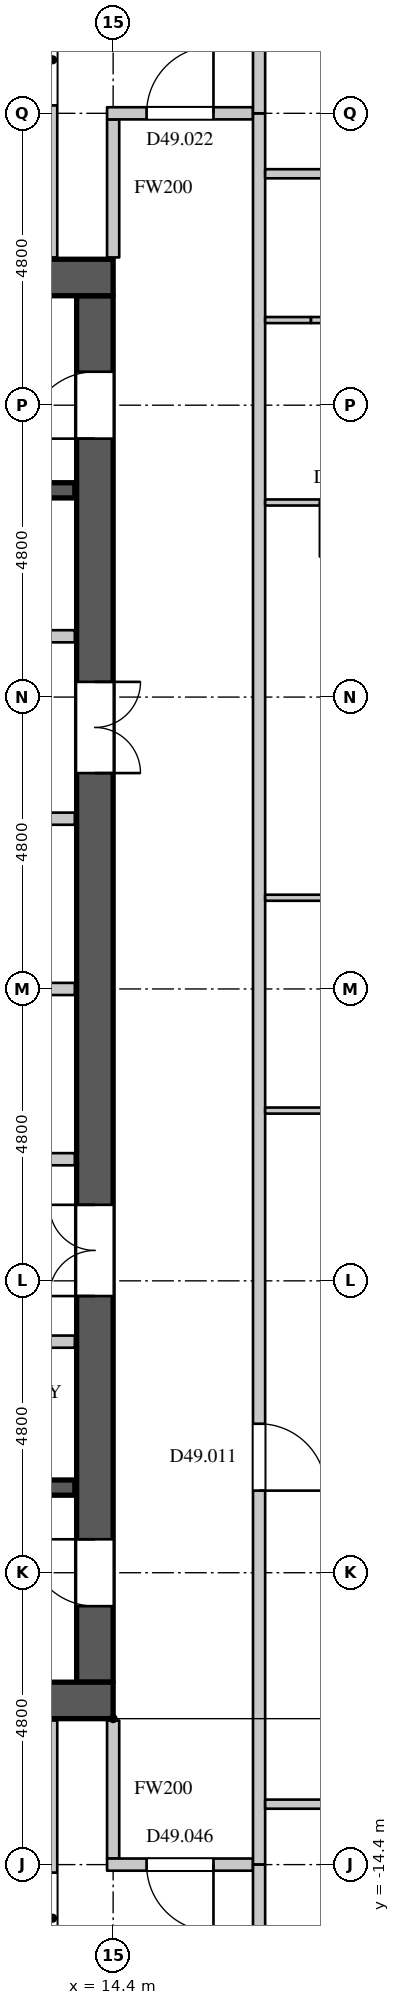
"""IFC4 building model, lengths in metres.
Left out: names, types, materials, properties, quantities, classifications, styles, units other than length and angle.
Written with IfcOpenShell. Run it as: python <this file> out.ifc"""

import sys

from ifc_helpers import new_model, si_unit, direction, frame, frame_2d, origin, place, context, subcontext, project, spatial, rectangle, extrude, element, fill, save


model = new_model("IFC4")
c1 = context("Model", 3, precision=1e-05, world=origin(), true_north=direction((0.0, 1.0)))
c2 = subcontext(c1, "Body", "Model", "MODEL_VIEW")
j1 = project(units=[si_unit("LENGTHUNIT", "METRE"), si_unit("PLANEANGLEUNIT", "RADIAN")], contexts=[c1])
p1 = place(None, origin())
s1 = spatial("IfcSite", under=j1, at=p1, CompositionType="ELEMENT")
p2 = place(p1, origin())
s2 = spatial("IfcBuilding", under=s1, at=p2, CompositionType="ELEMENT")
p3 = place(p2, frame((0.0, 0.0, 213.9)))
s3 = spatial("IfcBuildingStorey", under=s2, at=p3, CompositionType="ELEMENT", Elevation=213.9)
for number, where, z_axis, x_axis in (
    (1, (-14.4, 11.7, 0.0), (0.0, 0.0, 1.0), (1.0, 0.0, 0.0)),
    (2, (-14.4, -11.7, 0.0), (0.0, 0.0, 1.0), (1.0, 0.0, 0.0)),
):
    element("IfcWall", number, at=place(p3, frame(where, z_axis=z_axis, x_axis=x_axis)), inside=s3, PredefinedType="SHEAR", context=c2, shape_type="SweptSolid", body=[
        extrude(rectangle(XDim=28.8, YDim=0.6, at=frame_2d((14.4, 0.0))), origin(), (0.0, 0.0, 1.0), 4.2),
    ])
p4 = place(p3, frame((14.1, -11.4, 0.0), z_axis=(0.0, 0.0, 1.0), x_axis=(0.0, 1.0, 0.0)))
e3 = element("IfcWall", 3, at=p4, inside=s3, PredefinedType="SHEAR", context=c2, shape_type="SweptSolid", body=[
    extrude(rectangle(XDim=22.8, YDim=0.6, at=frame_2d((11.4, 0.0))), origin(), (0.0, 0.0, 1.0), 4.2),
])
p5 = place(p4, frame((20.45, 0.0, 0.0)))
e4 = element("IfcOpeningElement", 4, at=p5, cuts=e3, PredefinedType="OPENING", context=c2, shape_type="SweptSolid", body=[
    extrude(rectangle(XDim=1.1, YDim=2.2, at=frame_2d((0.55, 1.1))), frame((0.0, 0.31, 0.0), z_axis=(0.0, -1.0, 0.0), x_axis=(1.0, 0.0, 0.0)), (0.0, 0.0, 1.0), 0.62),
])
p6 = place(p4, frame((1.25, 0.0, 0.0)))
e5 = element("IfcOpeningElement", 5, at=p6, cuts=e3, PredefinedType="OPENING", context=c2, shape_type="SweptSolid", body=[
    extrude(rectangle(XDim=1.1, YDim=2.2, at=frame_2d((0.55, 1.1))), frame((0.0, 0.31, 0.0), z_axis=(0.0, -1.0, 0.0), x_axis=(1.0, 0.0, 0.0)), (0.0, 0.0, 1.0), 0.62),
])
p7 = place(p4, frame((14.95, 0.0, 0.0)))
e6 = element("IfcOpeningElement", 6, at=p7, cuts=e3, PredefinedType="OPENING", context=c2, shape_type="SweptSolid", body=[
    extrude(rectangle(XDim=1.5, YDim=2.4, at=frame_2d((0.75, 1.2))), frame((0.0, 0.31, 0.0), z_axis=(0.0, -1.0, 0.0), x_axis=(1.0, 0.0, 0.0)), (0.0, 0.0, 1.0), 0.62),
])
p8 = place(p4, frame((6.35, 0.0, 0.0)))
e7 = element("IfcOpeningElement", 7, at=p8, cuts=e3, PredefinedType="OPENING", context=c2, shape_type="SweptSolid", body=[
    extrude(rectangle(XDim=1.5, YDim=2.4, at=frame_2d((0.75, 1.2))), frame((0.0, 0.31, 0.0), z_axis=(0.0, -1.0, 0.0), x_axis=(1.0, 0.0, 0.0)), (0.0, 0.0, 1.0), 0.62),
])
p9 = place(p3, frame((-7.7, -5.8, 0.0), z_axis=(0.0, 0.0, 1.0), x_axis=(1.0, 0.0, 0.0)))
e8 = element("IfcWall", 8, at=p9, inside=s3, PredefinedType="PARTITIONING", context=c2, shape_type="SweptSolid", body=[
    extrude(rectangle(XDim=21.47, YDim=0.2, at=frame_2d((10.735, 0.0))), origin(), (0.0, 0.0, 1.0), 3.95),
])
p10 = place(p9, frame((1.75, 0.0, 0.0)))
e9 = element("IfcOpeningElement", 9, at=p10, cuts=e8, PredefinedType="OPENING", context=c2, shape_type="SweptSolid", body=[
    extrude(rectangle(XDim=0.9, YDim=2.2, at=frame_2d((0.45, 1.1))), frame((0.0, 0.11, 0.0), z_axis=(0.0, -1.0, 0.0), x_axis=(1.0, 0.0, 0.0)), (0.0, 0.0, 1.0), 0.22),
])
p11 = place(p9, frame((5.95, 0.0, 0.0)))
e10 = element("IfcOpeningElement", 10, at=p11, cuts=e8, PredefinedType="OPENING", context=c2, shape_type="SweptSolid", body=[
    extrude(rectangle(XDim=0.9, YDim=2.2, at=frame_2d((0.45, 1.1))), frame((0.0, 0.11, 0.0), z_axis=(0.0, -1.0, 0.0), x_axis=(1.0, 0.0, 0.0)), (0.0, 0.0, 1.0), 0.22),
])
p12 = place(p9, frame((10.35, 0.0, 0.0)))
e11 = element("IfcOpeningElement", 11, at=p12, cuts=e8, PredefinedType="OPENING", context=c2, shape_type="SweptSolid", body=[
    extrude(rectangle(XDim=0.9, YDim=2.2, at=frame_2d((0.45, 1.1))), frame((0.0, 0.11, 0.0), z_axis=(0.0, -1.0, 0.0), x_axis=(1.0, 0.0, 0.0)), (0.0, 0.0, 1.0), 0.22),
])
p13 = place(p9, frame((14.65, 0.0, 0.0)))
e12 = element("IfcOpeningElement", 12, at=p13, cuts=e8, PredefinedType="OPENING", context=c2, shape_type="SweptSolid", body=[
    extrude(rectangle(XDim=0.9, YDim=2.2, at=frame_2d((0.45, 1.1))), frame((0.0, 0.11, 0.0), z_axis=(0.0, -1.0, 0.0), x_axis=(1.0, 0.0, 0.0)), (0.0, 0.0, 1.0), 0.22),
])
p14 = place(p9, frame((18.75, 0.0, 0.0)))
e13 = element("IfcOpeningElement", 13, at=p14, cuts=e8, PredefinedType="OPENING", context=c2, shape_type="SweptSolid", body=[
    extrude(rectangle(XDim=0.9, YDim=2.2, at=frame_2d((0.45, 1.1))), frame((0.0, 0.11, 0.0), z_axis=(0.0, -1.0, 0.0), x_axis=(1.0, 0.0, 0.0)), (0.0, 0.0, 1.0), 0.22),
])
p15 = place(p3, frame((-7.7, 5.8, 0.0), z_axis=(0.0, 0.0, 1.0), x_axis=(1.0, 0.0, 0.0)))
e14 = element("IfcWall", 14, at=p15, inside=s3, PredefinedType="PARTITIONING", context=c2, shape_type="SweptSolid", body=[
    extrude(rectangle(XDim=21.47, YDim=0.2, at=frame_2d((10.735, 0.0))), origin(), (0.0, 0.0, 1.0), 3.95),
])
p16 = place(p15, frame((4.95, 0.0, 0.0)))
e15 = element("IfcOpeningElement", 15, at=p16, cuts=e14, PredefinedType="OPENING", context=c2, shape_type="SweptSolid", body=[
    extrude(rectangle(XDim=0.9, YDim=2.2, at=frame_2d((0.45, 1.1))), frame((0.0, 0.11, 0.0), z_axis=(0.0, -1.0, 0.0), x_axis=(1.0, 0.0, 0.0)), (0.0, 0.0, 1.0), 0.22),
])
p17 = place(p15, frame((15.55, 0.0, 0.0)))
e16 = element("IfcOpeningElement", 16, at=p17, cuts=e14, PredefinedType="OPENING", context=c2, shape_type="SweptSolid", body=[
    extrude(rectangle(XDim=0.9, YDim=2.2, at=frame_2d((0.45, 1.1))), frame((0.0, 0.11, 0.0), z_axis=(0.0, -1.0, 0.0), x_axis=(1.0, 0.0, 0.0)), (0.0, 0.0, 1.0), 0.22),
])
p18 = place(p3, frame((14.4, -14.3, 0.0), z_axis=(0.0, 0.0, 1.0), x_axis=(0.0, 1.0, 0.0)))
e17 = element("IfcWall", 17, at=p18, inside=s3, PredefinedType="PARTITIONING", context=c2, shape_type="SweptSolid", body=[
    extrude(rectangle(XDim=2.27, YDim=0.2, at=frame_2d((1.135, 0.0))), origin(), (0.0, 0.0, 1.0), 3.95),
])
p19 = place(p3, frame((14.3, -14.4, 0.0), z_axis=(0.0, 0.0, 1.0), x_axis=(1.0, 0.0, 0.0)))
e18 = element("IfcWall", 18, at=p19, inside=s3, PredefinedType="PARTITIONING", context=c2, shape_type="SweptSolid", body=[
    extrude(rectangle(XDim=2.4, YDim=0.2, at=frame_2d((1.2, 0.0))), origin(), (0.0, 0.0, 1.0), 3.95),
])
p20 = place(p19, frame((0.65, 0.0, 0.0)))
e19 = element("IfcOpeningElement", 19, at=p20, cuts=e18, PredefinedType="OPENING", context=c2, shape_type="SweptSolid", body=[
    extrude(rectangle(XDim=1.1, YDim=2.4, at=frame_2d((0.55, 1.2))), frame((0.0, 0.11, 0.0), z_axis=(0.0, -1.0, 0.0), x_axis=(1.0, 0.0, 0.0)), (0.0, 0.0, 1.0), 0.22),
])
p21 = place(p3, frame((14.4, 12.03, 0.0), z_axis=(0.0, 0.0, 1.0), x_axis=(0.0, 1.0, 0.0)))
e20 = element("IfcWall", 20, at=p21, inside=s3, PredefinedType="PARTITIONING", context=c2, shape_type="SweptSolid", body=[
    extrude(rectangle(XDim=2.27, YDim=0.2, at=frame_2d((1.135, 0.0))), origin(), (0.0, 0.0, 1.0), 3.95),
])
p22 = place(p3, frame((14.3, 14.4, 0.0), z_axis=(0.0, 0.0, 1.0), x_axis=(1.0, 0.0, 0.0)))
e21 = element("IfcWall", 21, at=p22, inside=s3, PredefinedType="PARTITIONING", context=c2, shape_type="SweptSolid", body=[
    extrude(rectangle(XDim=2.4, YDim=0.2, at=frame_2d((1.2, 0.0))), origin(), (0.0, 0.0, 1.0), 3.95),
])
p23 = place(p22, frame((0.65, 0.0, 0.0)))
e22 = element("IfcOpeningElement", 22, at=p23, cuts=e21, PredefinedType="OPENING", context=c2, shape_type="SweptSolid", body=[
    extrude(rectangle(XDim=1.1, YDim=2.4, at=frame_2d((0.55, 1.2))), frame((0.0, 0.11, 0.0), z_axis=(0.0, -1.0, 0.0), x_axis=(1.0, 0.0, 0.0)), (0.0, 0.0, 1.0), 0.22),
])
p24 = place(p3, frame((16.8, -14.4, 0.0), z_axis=(0.0, 0.0, 1.0), x_axis=(0.0, 1.0, 0.0)))
e23 = element("IfcWall", 23, at=p24, inside=s3, PredefinedType="PARTITIONING", context=c2, shape_type="SweptSolid", body=[
    extrude(rectangle(XDim=28.8, YDim=0.2, at=frame_2d((14.4, 0.0))), origin(), (0.0, 0.0, 1.0), 3.95),
])
p25 = place(p24, frame((6.15, 0.0, 0.0)))
e24 = element("IfcOpeningElement", 24, at=p25, cuts=e23, PredefinedType="OPENING", context=c2, shape_type="SweptSolid", body=[
    extrude(rectangle(XDim=1.1, YDim=2.4, at=frame_2d((0.55, 1.2))), frame((0.0, 0.11, 0.0), z_axis=(0.0, -1.0, 0.0), x_axis=(1.0, 0.0, 0.0)), (0.0, 0.0, 1.0), 0.22),
])
p26 = place(p3, frame((13.406, -25.731, 0.0), z_axis=(0.0, 0.0, 1.0), x_axis=(0.0, 1.0, 0.0)))
e25 = element("IfcWall", 25, at=p26, inside=s3, PredefinedType="PARTITIONING", context=c2, shape_type="SweptSolid", body=[
    extrude(rectangle(XDim=13.701, YDim=0.15, at=frame_2d((6.851, 0.0))), origin(), (0.0, 0.0, 1.0), 3.3),
])
p27 = place(p26, frame((9.7, 0.0, 0.0)))
e26 = element("IfcOpeningElement", 26, at=p27, cuts=e25, PredefinedType="OPENING", context=c2, shape_type="SweptSolid", body=[
    extrude(rectangle(XDim=1.5, YDim=2.2, at=frame_2d((0.75, 1.1))), frame((0.0, 0.085, 0.0), z_axis=(0.0, -1.0, 0.0), x_axis=(1.0, 0.0, 0.0)), (0.0, 0.0, 1.0), 0.17),
])
p28 = place(p3, frame((13.406, 12.03, 0.0), z_axis=(0.0, 0.0, 1.0), x_axis=(0.0, 1.0, 0.0)))
e27 = element("IfcWall", 27, at=p28, inside=s3, PredefinedType="PARTITIONING", context=c2, shape_type="SweptSolid", body=[
    extrude(rectangle(XDim=13.701, YDim=0.15, at=frame_2d((6.851, 0.0))), origin(), (0.0, 0.0, 1.0), 3.3),
])
p29 = place(p28, frame((2.5, 0.0, 0.0)))
e28 = element("IfcOpeningElement", 28, at=p29, cuts=e27, PredefinedType="OPENING", context=c2, shape_type="SweptSolid", body=[
    extrude(rectangle(XDim=1.5, YDim=2.2, at=frame_2d((0.75, 1.1))), frame((0.0, 0.085, 0.0), z_axis=(0.0, -1.0, 0.0), x_axis=(1.0, 0.0, 0.0)), (0.0, 0.0, 1.0), 0.17),
])
p30 = place(p3, frame((16.9, -13.406, 0.0), z_axis=(0.0, 0.0, 1.0), x_axis=(1.0, 0.0, 0.0)))
e29 = element("IfcWall", 29, at=p30, inside=s3, PredefinedType="PARTITIONING", context=c2, shape_type="SweptSolid", body=[
    extrude(rectangle(XDim=8.324, YDim=0.15, at=frame_2d((4.162, 0.0))), origin(), (0.0, 0.0, 1.0), 3.95),
])
p31 = place(p30, frame((1.2, 0.0, 0.0)))
e30 = element("IfcOpeningElement", 30, at=p31, cuts=e29, PredefinedType="OPENING", context=c2, shape_type="SweptSolid", body=[
    extrude(rectangle(XDim=0.95, YDim=2.2, at=frame_2d((0.475, 1.1))), frame((0.0, 0.085, 0.0), z_axis=(0.0, -1.0, 0.0), x_axis=(1.0, 0.0, 0.0)), (0.0, 0.0, 1.0), 0.17),
])
p32 = place(p3, frame((16.9, 13.406, 0.0), z_axis=(0.0, 0.0, 1.0), x_axis=(1.0, 0.0, 0.0)))
e31 = element("IfcWall", 31, at=p32, inside=s3, PredefinedType="PARTITIONING", context=c2, shape_type="SweptSolid", body=[
    extrude(rectangle(XDim=8.324, YDim=0.15, at=frame_2d((4.162, 0.0))), origin(), (0.0, 0.0, 1.0), 3.95),
])
p33 = place(p32, frame((5.0, 0.0, 0.0)))
e32 = element("IfcOpeningElement", 32, at=p33, cuts=e31, PredefinedType="OPENING", context=c2, shape_type="SweptSolid", body=[
    extrude(rectangle(XDim=1.5, YDim=2.2, at=frame_2d((0.75, 1.1))), frame((0.0, 0.085, 0.0), z_axis=(0.0, -1.0, 0.0), x_axis=(1.0, 0.0, 0.0)), (0.0, 0.0, 1.0), 0.17),
])
p34 = place(p32, frame((1.0, 0.0, 0.0)))
e33 = element("IfcOpeningElement", 33, at=p34, cuts=e31, PredefinedType="OPENING", context=c2, shape_type="SweptSolid", body=[
    extrude(rectangle(XDim=0.9, YDim=2.2, at=frame_2d((0.45, 1.1))), frame((0.0, 0.085, 0.0), z_axis=(0.0, -1.0, 0.0), x_axis=(1.0, 0.0, 0.0)), (0.0, 0.0, 1.0), 0.17),
])
for number, where, z_axis, x_axis in (
    (34, (16.8, -19.803, 0.0), (0.0, 0.0, 1.0), (0.0, 1.0, 0.0)),
    (35, (16.8, 14.4, 0.0), (0.0, 0.0, 1.0), (0.0, 1.0, 0.0)),
):
    element("IfcWall", number, at=place(p3, frame(where, z_axis=z_axis, x_axis=x_axis)), inside=s3, PredefinedType="PARTITIONING", context=c2, shape_type="SweptSolid", body=[
        extrude(rectangle(XDim=5.403, YDim=0.2, at=frame_2d((2.702, 0.0))), origin(), (0.0, 0.0, 1.0), 3.95),
    ])
p35 = place(p3, frame((7.8, -2.8, 0.0), z_axis=(0.0, 0.0, 1.0), x_axis=(1.0, 0.0, 0.0)))
e36 = element("IfcWall", 36, at=p35, inside=s3, PredefinedType="PARTITIONING", context=c2, shape_type="SweptSolid", body=[
    extrude(rectangle(XDim=5.97, YDim=0.2, at=frame_2d((2.985, 0.0))), origin(), (0.0, 0.0, 1.0), 3.95),
])
p36 = place(p35, frame((2.55, 0.0, 0.0)))
e37 = element("IfcOpeningElement", 37, at=p36, cuts=e36, PredefinedType="OPENING", context=c2, shape_type="SweptSolid", body=[
    extrude(rectangle(XDim=0.9, YDim=2.2, at=frame_2d((0.45, 1.1))), frame((0.0, 0.11, 0.0), z_axis=(0.0, -1.0, 0.0), x_axis=(1.0, 0.0, 0.0)), (0.0, 0.0, 1.0), 0.22),
])
p37 = place(p3, frame((7.8, 0.0, 0.0), z_axis=(0.0, 0.0, 1.0), x_axis=(1.0, 0.0, 0.0)))
e38 = element("IfcWall", 38, at=p37, inside=s3, PredefinedType="PARTITIONING", context=c2, shape_type="SweptSolid", body=[
    extrude(rectangle(XDim=5.97, YDim=0.2, at=frame_2d((2.985, 0.0))), origin(), (0.0, 0.0, 1.0), 3.95),
])
p38 = place(p3, frame((10.42, 2.8, 0.0), z_axis=(0.0, 0.0, 1.0), x_axis=(1.0, 0.0, 0.0)))
e39 = element("IfcWall", 39, at=p38, inside=s3, PredefinedType="PARTITIONING", context=c2, shape_type="SweptSolid", body=[
    extrude(rectangle(XDim=3.35, YDim=0.2, at=frame_2d((1.675, 0.0))), origin(), (0.0, 0.0, 1.0), 3.95),
])
p39 = place(p38, frame((1.35, 0.0, 0.0)))
e40 = element("IfcOpeningElement", 40, at=p39, cuts=e39, PredefinedType="OPENING", context=c2, shape_type="SweptSolid", body=[
    extrude(rectangle(XDim=0.6, YDim=2.0, at=frame_2d((0.3, 1.0))), frame((0.0, 0.11, 0.0), z_axis=(0.0, -1.0, 0.0), x_axis=(1.0, 0.0, 0.0)), (0.0, 0.0, 1.0), 0.22),
])
p40 = place(p3, frame((5.525, -8.2, 0.0), z_axis=(0.0, 0.0, 1.0), x_axis=(1.0, 0.0, 0.0)))
e41 = element("IfcWall", 41, at=p40, inside=s3, PredefinedType="SHEAR", context=c2, shape_type="SweptSolid", body=[
    extrude(rectangle(XDim=8.245, YDim=0.25, at=frame_2d((4.123, 0.0))), origin(), (0.0, 0.0, 1.0), 3.95),
])
p41 = place(p3, frame((5.275, 8.2, 0.0), z_axis=(0.0, 0.0, 1.0), x_axis=(1.0, 0.0, 0.0)))
e42 = element("IfcWall", 42, at=p41, inside=s3, PredefinedType="SHEAR", context=c2, shape_type="SweptSolid", body=[
    extrude(rectangle(XDim=8.495, YDim=0.25, at=frame_2d((4.248, 0.0))), origin(), (0.0, 0.0, 1.0), 3.95),
])
p42 = place(p3, frame((16.9, -2.0, 0.0), z_axis=(0.0, 0.0, 1.0), x_axis=(1.0, 0.0, 0.0)))
e43 = element("IfcWall", 43, at=p42, inside=s3, PredefinedType="PARTITIONING", context=c2, shape_type="SweptSolid", body=[
    extrude(rectangle(XDim=3.75, YDim=0.1, at=frame_2d((1.875, 0.0))), origin(), (0.0, 0.0, 1.0), 3.95),
])
p43 = place(p42, frame((1.45, 0.0, 0.0)))
e44 = element("IfcOpeningElement", 44, at=p43, cuts=e43, PredefinedType="OPENING", context=c2, shape_type="SweptSolid", body=[
    extrude(rectangle(XDim=0.9, YDim=2.2, at=frame_2d((0.45, 1.1))), frame((0.0, 0.06, 0.0), z_axis=(0.0, -1.0, 0.0), x_axis=(1.0, 0.0, 0.0)), (0.0, 0.0, 1.0), 0.12),
])
p44 = place(p3, frame((16.9, 1.5, 0.0), z_axis=(0.0, 0.0, 1.0), x_axis=(1.0, 0.0, 0.0)))
e45 = element("IfcWall", 45, at=p44, inside=s3, PredefinedType="PARTITIONING", context=c2, shape_type="SweptSolid", body=[
    extrude(rectangle(XDim=3.725, YDim=0.1, at=frame_2d((1.863, 0.0))), origin(), (0.0, 0.0, 1.0), 3.95),
])
p45 = place(p3, frame((16.9, 8.0, 0.0), z_axis=(0.0, 0.0, 1.0), x_axis=(1.0, 0.0, 0.0)))
e46 = element("IfcWall", 46, at=p45, inside=s3, PredefinedType="PARTITIONING", context=c2, shape_type="SweptSolid", body=[
    extrude(rectangle(XDim=2.775, YDim=0.1, at=frame_2d((1.388, 0.0))), origin(), (0.0, 0.0, 1.0), 3.95),
])
p46 = place(p45, frame((0.9, 0.0, 0.0)))
e47 = element("IfcOpeningElement", 47, at=p46, cuts=e46, PredefinedType="OPENING", context=c2, shape_type="SweptSolid", body=[
    extrude(rectangle(XDim=0.9, YDim=2.2, at=frame_2d((0.45, 1.1))), frame((0.0, 0.06, 0.0), z_axis=(0.0, -1.0, 0.0), x_axis=(1.0, 0.0, 0.0)), (0.0, 0.0, 1.0), 0.12),
])
p47 = place(p3, frame((16.9, 11.0, 0.0), z_axis=(0.0, 0.0, 1.0), x_axis=(1.0, 0.0, 0.0)))
e48 = element("IfcWall", 48, at=p47, inside=s3, PredefinedType="PARTITIONING", context=c2, shape_type="SweptSolid", body=[
    extrude(rectangle(XDim=0.754, YDim=0.1, at=frame_2d((0.377, 0.0))), origin(), (0.0, 0.0, 1.0), 3.35),
])
p48 = place(p3, frame((17.654, 11.0, 0.0), z_axis=(0.0, 0.0, 1.0), x_axis=(1.0, 0.0, 0.0)))
e49 = element("IfcWall", 49, at=p48, inside=s3, PredefinedType="PARTITIONING", context=c2, shape_type="SweptSolid", body=[
    extrude(rectangle(XDim=2.021, YDim=0.1, at=frame_2d((1.011, 0.0))), origin(), (0.0, 0.0, 1.0), 3.95),
])
p49 = place(p5, origin())
e50 = element("IfcDoor", 50, at=p49, inside=s3, OperationType="SINGLE_SWING_LEFT", PredefinedType="DOOR", context=c2, shape_type="SweptSolid", body=[
    extrude(rectangle(XDim=1.1, YDim=2.2, at=frame_2d((0.55, 1.1))), frame((0.0, 0.295, 0.0), z_axis=(0.0, -1.0, 0.0), x_axis=(1.0, 0.0, 0.0)), (0.0, 0.0, 1.0), 0.05),
])
fill(e4, e50)
p50 = place(p6, origin())
e51 = element("IfcDoor", 51, at=p50, inside=s3, OperationType="SINGLE_SWING_RIGHT", PredefinedType="DOOR", context=c2, shape_type="SweptSolid", body=[
    extrude(rectangle(XDim=1.1, YDim=2.2, at=frame_2d((0.55, 1.1))), frame((0.0, 0.295, 0.0), z_axis=(0.0, -1.0, 0.0), x_axis=(1.0, 0.0, 0.0)), (0.0, 0.0, 1.0), 0.05),
])
fill(e5, e51)
p51 = place(p7, origin())
e52 = element("IfcDoor", 52, at=p51, inside=s3, OperationType="DOUBLE_DOOR_SINGLE_SWING", PredefinedType="DOOR", context=c2, shape_type="SweptSolid", body=[
    extrude(rectangle(XDim=1.5, YDim=2.4, at=frame_2d((0.75, 1.2))), frame((0.0, -0.245, 0.0), z_axis=(0.0, -1.0, 0.0), x_axis=(1.0, 0.0, 0.0)), (0.0, 0.0, 1.0), 0.05),
])
fill(e6, e52)
p52 = place(p8, origin())
e53 = element("IfcDoor", 53, at=p52, inside=s3, OperationType="DOUBLE_DOOR_SINGLE_SWING", PredefinedType="DOOR", context=c2, shape_type="SweptSolid", body=[
    extrude(rectangle(XDim=1.5, YDim=2.4, at=frame_2d((0.75, 1.2))), frame((0.0, 0.295, 0.0), z_axis=(0.0, -1.0, 0.0), x_axis=(1.0, 0.0, 0.0)), (0.0, 0.0, 1.0), 0.05),
])
fill(e7, e53)
p53 = place(p25, origin())
e54 = element("IfcDoor", 54, at=p53, inside=s3, OperationType="SINGLE_SWING_RIGHT", PredefinedType="DOOR", context=c2, shape_type="SweptSolid", body=[
    extrude(rectangle(XDim=1.1, YDim=2.4, at=frame_2d((0.55, 1.2))), frame((0.0, 0.025, 0.0), z_axis=(0.0, -1.0, 0.0), x_axis=(1.0, 0.0, 0.0)), (0.0, 0.0, 1.0), 0.05),
])
fill(e24, e54)
p54 = place(p46, origin())
e55 = element("IfcDoor", 55, at=p54, inside=s3, OperationType="SINGLE_SWING_RIGHT", PredefinedType="DOOR", context=c2, shape_type="SweptSolid", body=[
    extrude(rectangle(XDim=0.9, YDim=2.2, at=frame_2d((0.45, 1.1))), frame((0.0, 0.025, 0.0), z_axis=(0.0, -1.0, 0.0), x_axis=(1.0, 0.0, 0.0)), (0.0, 0.0, 1.0), 0.05),
])
fill(e47, e55)
p55 = place(p23, origin())
e56 = element("IfcDoor", 56, at=p55, inside=s3, OperationType="SINGLE_SWING_RIGHT", PredefinedType="DOOR", context=c2, shape_type="SweptSolid", body=[
    extrude(rectangle(XDim=1.1, YDim=2.4, at=frame_2d((0.55, 1.2))), frame((0.0, 0.025, 0.0), z_axis=(0.0, -1.0, 0.0), x_axis=(1.0, 0.0, 0.0)), (0.0, 0.0, 1.0), 0.05),
])
fill(e22, e56)
p56 = place(p29, origin())
e57 = element("IfcDoor", 57, at=p56, inside=s3, OperationType="DOUBLE_DOOR_SINGLE_SWING", PredefinedType="DOOR", context=c2, shape_type="SweptSolid", body=[
    extrude(rectangle(XDim=1.5, YDim=2.2, at=frame_2d((0.75, 1.1))), frame((0.0, 0.025, 0.0), z_axis=(0.0, -1.0, 0.0), x_axis=(1.0, 0.0, 0.0)), (0.0, 0.0, 1.0), 0.05),
])
fill(e28, e57)
p57 = place(p20, origin())
e58 = element("IfcDoor", 58, at=p57, inside=s3, OperationType="SINGLE_SWING_LEFT", PredefinedType="DOOR", context=c2, shape_type="SweptSolid", body=[
    extrude(rectangle(XDim=1.1, YDim=2.4, at=frame_2d((0.55, 1.2))), frame((0.0, 0.025, 0.0), z_axis=(0.0, -1.0, 0.0), x_axis=(1.0, 0.0, 0.0)), (0.0, 0.0, 1.0), 0.05),
])
fill(e19, e58)
p58 = place(p27, origin())
e59 = element("IfcDoor", 59, at=p58, inside=s3, OperationType="DOUBLE_DOOR_SINGLE_SWING", PredefinedType="DOOR", context=c2, shape_type="SweptSolid", body=[
    extrude(rectangle(XDim=1.5, YDim=2.2, at=frame_2d((0.75, 1.1))), frame((0.0, 0.025, 0.0), z_axis=(0.0, -1.0, 0.0), x_axis=(1.0, 0.0, 0.0)), (0.0, 0.0, 1.0), 0.05),
])
fill(e26, e59)
save(model, sys.argv[1])
